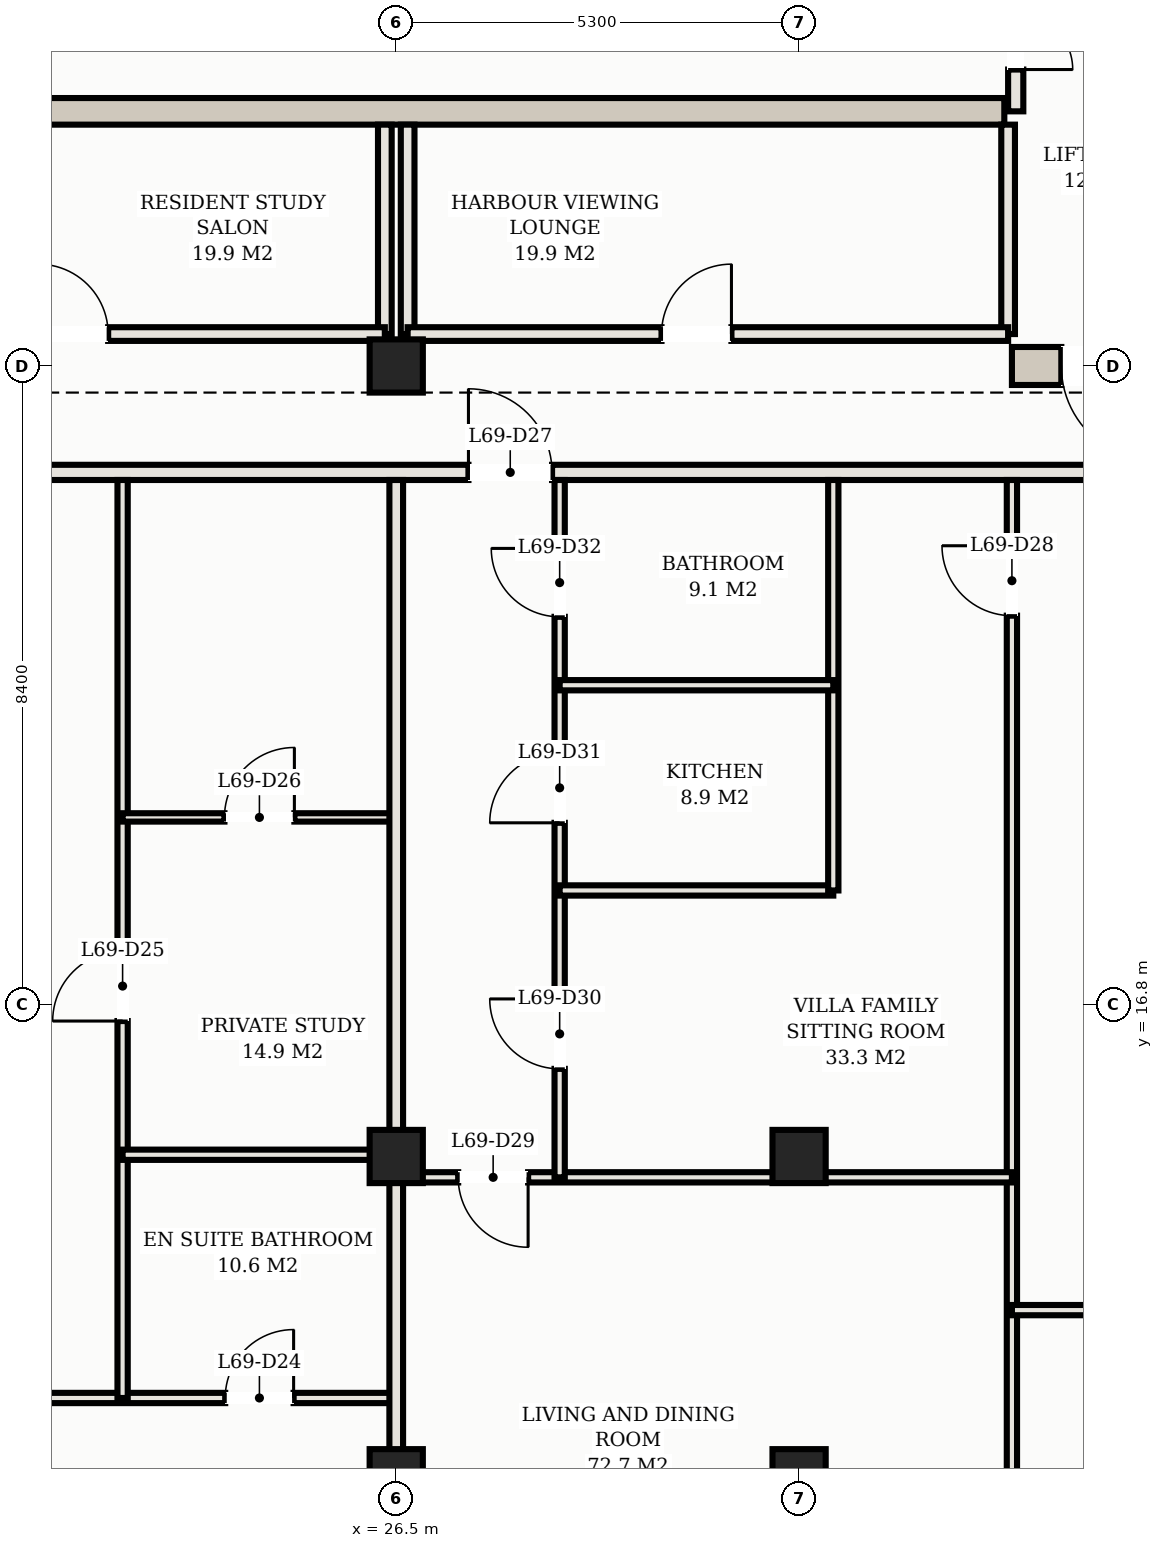
"""IFC4 building model, lengths in metres.
Left out: names, types, materials, properties, quantities, classifications, styles, units other than length and angle.
Written with IfcOpenShell. Run it as: python <this file> out.ifc"""

import sys

from ifc_helpers import new_model, si_unit, direction, frame, frame_2d, origin, origin_2d, place, context, subcontext, project, spatial, rectangle, hollow_rectangle, extrude, element, fill, save


model = new_model("IFC4")
c1 = context("Model", 3, precision=1e-05, world=origin(), true_north=direction((0.0, 1.0)))
c2 = subcontext(c1, "Body", "Model", "MODEL_VIEW")
j1 = project(units=[si_unit("LENGTHUNIT", "METRE"), si_unit("PLANEANGLEUNIT", "RADIAN")], contexts=[c1])
p1 = place(None, origin())
s1 = spatial("IfcSite", under=j1, at=p1, CompositionType="ELEMENT")
p2 = place(p1, origin())
s2 = spatial("IfcBuilding", under=s1, at=p2, CompositionType="ELEMENT")
p3 = place(p2, frame((0.0, 0.0, 249.5)))
s3 = spatial("IfcBuildingStorey", under=s2, at=p3, CompositionType="ELEMENT", Elevation=249.5)
p4 = place(p3, frame((34.6, 25.2, 0.0), z_axis=(0.0, 0.0, 1.0), x_axis=(1.0, 0.0, 0.0)))
e1 = element("IfcWall", 1, at=p4, inside=s3, PredefinedType="SHEAR", context=c2, shape_type="SweptSolid", body=[
    extrude(rectangle(XDim=8.05, YDim=0.5, at=frame_2d((4.025, 0.0))), origin(), (0.0, 0.0, 1.0), 3.11),
])
p5 = place(p4, frame((0.65, 0.0, 0.0)))
e2 = element("IfcOpeningElement", 2, at=p5, cuts=e1, PredefinedType="OPENING", context=c2, shape_type="SweptSolid", body=[
    extrude(rectangle(XDim=1.25, YDim=2.2, at=frame_2d((0.625, 1.1))), frame((0.0, 0.26, 0.0), z_axis=(0.0, -1.0, 0.0), x_axis=(1.0, 0.0, 0.0)), (0.0, 0.0, 1.0), 0.52),
])
p6 = place(p3, frame((18.5, 28.55, 0.0), z_axis=(0.0, 0.0, 1.0), x_axis=(1.0, 0.0, 0.0)))
e3 = element("IfcWall", 3, at=p6, inside=s3, PredefinedType="SHEAR", context=c2, shape_type="SweptSolid", body=[
    extrude(rectangle(XDim=16.0, YDim=0.35, at=frame_2d((8.0, 0.0))), origin(), (0.0, 0.0, 1.0), 3.11),
])
for number, where, z_axis, x_axis in (
    (4, (26.5, 25.2, 0.0), (0.0, 0.0, 1.0), (1.0, 0.0, 0.0)),
    (5, (26.5, 14.8, 0.0), (0.0, 0.0, 1.0), (1.0, 0.0, 0.0)),
    (6, (26.5, 10.6, 0.0), (0.0, 0.0, 1.0), (1.0, 0.0, 0.0)),
    (7, (31.8, 14.8, 0.0), (0.0, 0.0, 1.0), (1.0, 0.0, 0.0)),
    (8, (31.8, 10.6, 0.0), (0.0, 0.0, 1.0), (1.0, 0.0, 0.0)),
):
    element("IfcColumn", number, at=place(p3, frame(where, z_axis=z_axis, x_axis=x_axis)), inside=s3, PredefinedType="COLUMN", context=c2, shape_type="SweptSolid", body=[
        extrude(hollow_rectangle(XDim=0.7, YDim=0.7, WallThickness=0.025, at=origin_2d()), origin(), (0.0, 0.0, 1.0), 3.3),
    ])
p7 = place(p3, frame((34.65, 28.55, 0.0), z_axis=(0.0, 0.0, 1.0), x_axis=(0.0, 1.0, 0.0)))
e9 = element("IfcWall", 9, at=p7, inside=s3, PredefinedType="PARTITIONING", context=c2, shape_type="SweptSolid", body=[
    extrude(rectangle(XDim=2.6, YDim=0.2, at=frame_2d((1.3, 0.0))), origin(), (0.0, 0.0, 1.0), 2.45),
])
p8 = place(p7, frame((0.55, 0.0, 0.0)))
e10 = element("IfcOpeningElement", 10, at=p8, cuts=e9, PredefinedType="OPENING", context=c2, shape_type="SweptSolid", body=[
    extrude(rectangle(XDim=1.5, YDim=2.25, at=frame_2d((0.75, 1.125))), frame((0.0, 0.11, 0.0), z_axis=(0.0, -1.0, 0.0), x_axis=(1.0, 0.0, 0.0)), (0.0, 0.0, 1.0), 0.22),
])
p9 = place(p3, frame((26.35, 25.62, 0.0), z_axis=(0.0, 0.0, 1.0), x_axis=(0.0, 1.0, 0.0)))
e11 = element("IfcWall", 11, at=p9, inside=s3, PredefinedType="PARTITIONING", context=c2, shape_type="SweptSolid", body=[
    extrude(rectangle(XDim=2.755, YDim=0.18, at=frame_2d((1.377, 0.0))), origin(), (0.0, 0.0, 1.0), 2.45),
])
p10 = place(p3, frame((18.45, 25.62, 0.0), z_axis=(0.0, 0.0, 1.0), x_axis=(1.0, 0.0, 0.0)))
e12 = element("IfcWall", 12, at=p10, inside=s3, PredefinedType="PARTITIONING", context=c2, shape_type="SweptSolid", body=[
    extrude(rectangle(XDim=7.9, YDim=0.18, at=frame_2d((3.95, 0.0))), origin(), (0.0, 0.0, 1.0), 2.45),
])
p11 = place(p10, frame((3.34, 0.0, 0.0)))
e13 = element("IfcOpeningElement", 13, at=p11, cuts=e12, PredefinedType="OPENING", context=c2, shape_type="SweptSolid", body=[
    extrude(rectangle(XDim=0.92, YDim=2.15, at=frame_2d((0.46, 1.075))), frame((0.0, 0.1, 0.0), z_axis=(0.0, -1.0, 0.0), x_axis=(1.0, 0.0, 0.0)), (0.0, 0.0, 1.0), 0.2),
])
for number, where, z_axis, x_axis in (
    (14, (26.65, 25.62, 0.0), (0.0, 0.0, 1.0), (0.0, 1.0, 0.0)),
    (15, (34.55, 25.62, 0.0), (0.0, 0.0, 1.0), (0.0, 1.0, 0.0)),
):
    element("IfcWall", number, at=place(p3, frame(where, z_axis=z_axis, x_axis=x_axis)), inside=s3, PredefinedType="PARTITIONING", context=c2, shape_type="SweptSolid", body=[
        extrude(rectangle(XDim=2.755, YDim=0.18, at=frame_2d((1.377, 0.0))), origin(), (0.0, 0.0, 1.0), 2.45),
    ])
p12 = place(p3, frame((26.65, 25.62, 0.0), z_axis=(0.0, 0.0, 1.0), x_axis=(1.0, 0.0, 0.0)))
e16 = element("IfcWall", 16, at=p12, inside=s3, PredefinedType="PARTITIONING", context=c2, shape_type="SweptSolid", body=[
    extrude(rectangle(XDim=7.9, YDim=0.18, at=frame_2d((3.95, 0.0))), origin(), (0.0, 0.0, 1.0), 2.45),
])
p13 = place(p12, frame((3.34, 0.0, 0.0)))
e17 = element("IfcOpeningElement", 17, at=p13, cuts=e16, PredefinedType="OPENING", context=c2, shape_type="SweptSolid", body=[
    extrude(rectangle(XDim=0.92, YDim=2.15, at=frame_2d((0.46, 1.075))), frame((0.0, 0.1, 0.0), z_axis=(0.0, -1.0, 0.0), x_axis=(1.0, 0.0, 0.0)), (0.0, 0.0, 1.0), 0.2),
])
p14 = place(p3, frame((8.6, 23.8, 0.0), z_axis=(0.0, 0.0, 1.0), x_axis=(1.0, 0.0, 0.0)))
e18 = element("IfcWall", 18, at=p14, inside=s3, PredefinedType="PARTITIONING", context=c2, shape_type="SweptSolid", body=[
    extrude(rectangle(XDim=35.8, YDim=0.2, at=frame_2d((17.9, 0.0))), origin(), (0.0, 0.0, 1.0), 2.45),
])
p15 = place(p14, frame((2.75, 0.0, 0.0)))
e19 = element("IfcOpeningElement", 19, at=p15, cuts=e18, PredefinedType="OPENING", context=c2, shape_type="SweptSolid", body=[
    extrude(rectangle(XDim=1.1, YDim=2.25, at=frame_2d((0.55, 1.125))), frame((0.0, 0.11, 0.0), z_axis=(0.0, -1.0, 0.0), x_axis=(1.0, 0.0, 0.0)), (0.0, 0.0, 1.0), 0.22),
])
p16 = place(p14, frame((18.85, 0.0, 0.0)))
e20 = element("IfcOpeningElement", 20, at=p16, cuts=e18, PredefinedType="OPENING", context=c2, shape_type="SweptSolid", body=[
    extrude(rectangle(XDim=1.1, YDim=2.25, at=frame_2d((0.55, 1.125))), frame((0.0, 0.11, 0.0), z_axis=(0.0, -1.0, 0.0), x_axis=(1.0, 0.0, 0.0)), (0.0, 0.0, 1.0), 0.22),
])
p17 = place(p14, frame((0.505, 0.0, 0.0)))
e21 = element("IfcOpeningElement", 21, at=p17, cuts=e18, PredefinedType="OPENING", context=c2, shape_type="SweptSolid", body=[
    extrude(rectangle(XDim=0.9, YDim=2.15, at=frame_2d((0.45, 1.075))), frame((0.0, 0.11, 0.0), z_axis=(0.0, -1.0, 0.0), x_axis=(1.0, 0.0, 0.0)), (0.0, 0.0, 1.0), 0.22),
])
p18 = place(p14, frame((34.395, 0.0, 0.0)))
e22 = element("IfcOpeningElement", 22, at=p18, cuts=e18, PredefinedType="OPENING", context=c2, shape_type="SweptSolid", body=[
    extrude(rectangle(XDim=0.9, YDim=2.15, at=frame_2d((0.45, 1.075))), frame((0.0, 0.11, 0.0), z_axis=(0.0, -1.0, 0.0), x_axis=(1.0, 0.0, 0.0)), (0.0, 0.0, 1.0), 0.22),
])
p19 = place(p3, frame((17.8, 11.623, 0.0), z_axis=(0.0, 0.0, 1.0), x_axis=(1.0, 0.0, 0.0)))
e23 = element("IfcWall", 23, at=p19, inside=s3, PredefinedType="PARTITIONING", context=c2, shape_type="SweptSolid", body=[
    extrude(rectangle(XDim=8.7, YDim=0.135, at=frame_2d((4.35, 0.0))), origin(), (0.0, 0.0, 1.0), 2.45),
])
p20 = place(p19, frame((1.125, 0.0, 0.0)))
e24 = element("IfcOpeningElement", 24, at=p20, cuts=e23, PredefinedType="OPENING", context=c2, shape_type="SweptSolid", body=[
    extrude(rectangle(XDim=0.95, YDim=2.15, at=frame_2d((0.475, 1.075))), frame((0.0, 0.078, 0.0), z_axis=(0.0, -1.0, 0.0), x_axis=(1.0, 0.0, 0.0)), (0.0, 0.0, 1.0), 0.155),
])
p21 = place(p19, frame((6.45, 0.0, 0.0)))
e25 = element("IfcOpeningElement", 25, at=p21, cuts=e23, PredefinedType="OPENING", context=c2, shape_type="SweptSolid", body=[
    extrude(rectangle(XDim=0.9, YDim=2.15, at=frame_2d((0.45, 1.075))), frame((0.0, 0.078, 0.0), z_axis=(0.0, -1.0, 0.0), x_axis=(1.0, 0.0, 0.0)), (0.0, 0.0, 1.0), 0.155),
])
p22 = place(p3, frame((22.9, 11.623, 0.0), z_axis=(0.0, 0.0, 1.0), x_axis=(0.0, 1.0, 0.0)))
e26 = element("IfcWall", 26, at=p22, inside=s3, PredefinedType="PARTITIONING", context=c2, shape_type="SweptSolid", body=[
    extrude(rectangle(XDim=12.077, YDim=0.135, at=frame_2d((6.039, 0.0))), origin(), (0.0, 0.0, 1.0), 2.45),
])
p23 = place(p22, frame((4.959, 0.0, 0.0)))
e27 = element("IfcOpeningElement", 27, at=p23, cuts=e26, PredefinedType="OPENING", context=c2, shape_type="SweptSolid", body=[
    extrude(rectangle(XDim=0.92, YDim=2.15, at=frame_2d((0.46, 1.075))), frame((0.0, 0.078, 0.0), z_axis=(0.0, -1.0, 0.0), x_axis=(1.0, 0.0, 0.0)), (0.0, 0.0, 1.0), 0.155),
])
p24 = place(p3, frame((22.9, 14.823, 0.0), z_axis=(0.0, 0.0, 1.0), x_axis=(1.0, 0.0, 0.0)))
e28 = element("IfcWall", 28, at=p24, inside=s3, PredefinedType="PARTITIONING", context=c2, shape_type="SweptSolid", body=[
    extrude(rectangle(XDim=3.6, YDim=0.135, at=frame_2d((1.8, 0.0))), origin(), (0.0, 0.0, 1.0), 2.45),
])
p25 = place(p3, frame((22.9, 19.261, 0.0), z_axis=(0.0, 0.0, 1.0), x_axis=(1.0, 0.0, 0.0)))
e29 = element("IfcWall", 29, at=p25, inside=s3, PredefinedType="MOVABLE", context=c2, shape_type="SweptSolid", body=[
    extrude(rectangle(XDim=3.6, YDim=0.11, at=frame_2d((1.8, 0.0))), origin(), (0.0, 0.0, 1.0), 2.45),
])
p26 = place(p25, frame((1.34, 0.0, 0.0)))
e30 = element("IfcOpeningElement", 30, at=p26, cuts=e29, PredefinedType="OPENING", context=c2, shape_type="SweptSolid", body=[
    extrude(rectangle(XDim=0.92, YDim=2.15, at=frame_2d((0.46, 1.075))), frame((0.0, 0.065, 0.0), z_axis=(0.0, -1.0, 0.0), x_axis=(1.0, 0.0, 0.0)), (0.0, 0.0, 1.0), 0.13),
])
p27 = place(p3, frame((26.5, 6.92, 0.0), z_axis=(0.0, 0.0, 1.0), x_axis=(0.0, 1.0, 0.0)))
e31 = element("IfcWall", 31, at=p27, inside=s3, PredefinedType="PARTITIONING", context=c2, shape_type="SweptSolid", body=[
    extrude(rectangle(XDim=16.78, YDim=0.18, at=frame_2d((8.39, 0.0))), origin(), (0.0, 0.0, 1.0), 2.45),
])
p28 = place(p3, frame((34.6, 8.42, 0.0), z_axis=(0.0, 0.0, 1.0), x_axis=(0.0, 1.0, 0.0)))
e32 = element("IfcWall", 32, at=p28, inside=s3, PredefinedType="PARTITIONING", context=c2, shape_type="SweptSolid", body=[
    extrude(rectangle(XDim=15.28, YDim=0.135, at=frame_2d((7.64, 0.0))), origin(), (0.0, 0.0, 1.0), 2.45),
])
p29 = place(p28, frame((13.495, 0.0, 0.0)))
e33 = element("IfcOpeningElement", 33, at=p29, cuts=e32, PredefinedType="OPENING", context=c2, shape_type="SweptSolid", body=[
    extrude(rectangle(XDim=0.92, YDim=2.15, at=frame_2d((0.46, 1.075))), frame((0.0, 0.078, 0.0), z_axis=(0.0, -1.0, 0.0), x_axis=(1.0, 0.0, 0.0)), (0.0, 0.0, 1.0), 0.155),
])
p30 = place(p3, frame((26.5, 14.526, 0.0), z_axis=(0.0, 0.0, 1.0), x_axis=(1.0, 0.0, 0.0)))
e34 = element("IfcWall", 34, at=p30, inside=s3, PredefinedType="PARTITIONING", context=c2, shape_type="SweptSolid", body=[
    extrude(rectangle(XDim=8.1, YDim=0.135, at=frame_2d((4.05, 0.0))), origin(), (0.0, 0.0, 1.0), 2.45),
])
p31 = place(p30, frame((0.815, 0.0, 0.0)))
e35 = element("IfcOpeningElement", 35, at=p31, cuts=e34, PredefinedType="OPENING", context=c2, shape_type="SweptSolid", body=[
    extrude(rectangle(XDim=0.92, YDim=2.15, at=frame_2d((0.46, 1.075))), frame((0.0, 0.078, 0.0), z_axis=(0.0, -1.0, 0.0), x_axis=(1.0, 0.0, 0.0)), (0.0, 0.0, 1.0), 0.155),
])
p32 = place(p3, frame((28.65, 14.526, 0.0), z_axis=(0.0, 0.0, 1.0), x_axis=(0.0, 1.0, 0.0)))
e36 = element("IfcWall", 36, at=p32, inside=s3, PredefinedType="PARTITIONING", context=c2, shape_type="SweptSolid", body=[
    extrude(rectangle(XDim=9.174, YDim=0.135, at=frame_2d((4.587, 0.0))), origin(), (0.0, 0.0, 1.0), 2.45),
])
p33 = place(p32, frame((1.427, 0.0, 0.0)))
e37 = element("IfcOpeningElement", 37, at=p33, cuts=e36, PredefinedType="OPENING", context=c2, shape_type="SweptSolid", body=[
    extrude(rectangle(XDim=0.92, YDim=2.15, at=frame_2d((0.46, 1.075))), frame((0.0, 0.078, 0.0), z_axis=(0.0, -1.0, 0.0), x_axis=(1.0, 0.0, 0.0)), (0.0, 0.0, 1.0), 0.155),
])
p34 = place(p32, frame((4.664, 0.0, 0.0)))
e38 = element("IfcOpeningElement", 38, at=p34, cuts=e36, PredefinedType="OPENING", context=c2, shape_type="SweptSolid", body=[
    extrude(rectangle(XDim=0.92, YDim=2.15, at=frame_2d((0.46, 1.075))), frame((0.0, 0.078, 0.0), z_axis=(0.0, -1.0, 0.0), x_axis=(1.0, 0.0, 0.0)), (0.0, 0.0, 1.0), 0.155),
])
p35 = place(p32, frame((7.374, 0.0, 0.0)))
e39 = element("IfcOpeningElement", 39, at=p35, cuts=e36, PredefinedType="OPENING", context=c2, shape_type="SweptSolid", body=[
    extrude(rectangle(XDim=0.9, YDim=2.15, at=frame_2d((0.45, 1.075))), frame((0.0, 0.078, 0.0), z_axis=(0.0, -1.0, 0.0), x_axis=(1.0, 0.0, 0.0)), (0.0, 0.0, 1.0), 0.155),
])
p36 = place(p3, frame((28.65, 18.3, 0.0), z_axis=(0.0, 0.0, 1.0), x_axis=(1.0, 0.0, 0.0)))
e40 = element("IfcWall", 40, at=p36, inside=s3, PredefinedType="PARTITIONING", context=c2, shape_type="SweptSolid", body=[
    extrude(rectangle(XDim=3.6, YDim=0.135, at=frame_2d((1.8, 0.0))), origin(), (0.0, 0.0, 1.0), 2.45),
])
p37 = place(p3, frame((32.25, 18.3, 0.0), z_axis=(0.0, 0.0, 1.0), x_axis=(0.0, 1.0, 0.0)))
e41 = element("IfcWall", 41, at=p37, inside=s3, PredefinedType="PARTITIONING", context=c2, shape_type="SweptSolid", body=[
    extrude(rectangle(XDim=5.4, YDim=0.135, at=frame_2d((2.7, 0.0))), origin(), (0.0, 0.0, 1.0), 2.45),
])
p38 = place(p3, frame((28.65, 21.0, 0.0), z_axis=(0.0, 0.0, 1.0), x_axis=(1.0, 0.0, 0.0)))
e42 = element("IfcWall", 42, at=p38, inside=s3, PredefinedType="PARTITIONING", context=c2, shape_type="SweptSolid", body=[
    extrude(rectangle(XDim=3.6, YDim=0.135, at=frame_2d((1.8, 0.0))), origin(), (0.0, 0.0, 1.0), 2.45),
])
p39 = place(p3, frame((34.6, 12.779, 0.0), z_axis=(0.0, 0.0, 1.0), x_axis=(1.0, 0.0, 0.0)))
e43 = element("IfcWall", 43, at=p39, inside=s3, PredefinedType="PARTITIONING", context=c2, shape_type="SweptSolid", body=[
    extrude(rectangle(XDim=7.8, YDim=0.135, at=frame_2d((3.9, 0.0))), origin(), (0.0, 0.0, 1.0), 2.45),
])
p40 = place(p39, frame((1.625, 0.0, 0.0)))
e44 = element("IfcOpeningElement", 44, at=p40, cuts=e43, PredefinedType="OPENING", context=c2, shape_type="SweptSolid", body=[
    extrude(rectangle(XDim=0.95, YDim=2.15, at=frame_2d((0.475, 1.075))), frame((0.0, 0.078, 0.0), z_axis=(0.0, -1.0, 0.0), x_axis=(1.0, 0.0, 0.0)), (0.0, 0.0, 1.0), 0.155),
])
p41 = place(p39, frame((5.55, 0.0, 0.0)))
e45 = element("IfcOpeningElement", 45, at=p41, cuts=e43, PredefinedType="OPENING", context=c2, shape_type="SweptSolid", body=[
    extrude(rectangle(XDim=0.9, YDim=2.15, at=frame_2d((0.45, 1.075))), frame((0.0, 0.078, 0.0), z_axis=(0.0, -1.0, 0.0), x_axis=(1.0, 0.0, 0.0)), (0.0, 0.0, 1.0), 0.155),
])
p42 = place(p5, frame((1.25, 0.0, 0.0), z_axis=(0.0, 0.0, 1.0), x_axis=(-1.0, 0.0, 0.0)))
e46 = element("IfcDoor", 46, at=p42, inside=s3, OperationType="SINGLE_SWING_LEFT", PredefinedType="DOOR", context=c2, shape_type="SweptSolid", body=[
    extrude(rectangle(XDim=1.25, YDim=2.2, at=frame_2d((0.625, 1.1))), frame((0.0, 0.025, 0.0), z_axis=(0.0, -1.0, 0.0), x_axis=(1.0, 0.0, 0.0)), (0.0, 0.0, 1.0), 0.05),
])
fill(e2, e46)
p43 = place(p8, frame((1.5, 0.0, 0.0), z_axis=(0.0, 0.0, 1.0), x_axis=(-1.0, 0.0, 0.0)))
e47 = element("IfcDoor", 47, at=p43, inside=s3, OperationType="DOUBLE_DOOR_SINGLE_SWING", PredefinedType="DOOR", context=c2, shape_type="SweptSolid", body=[
    extrude(rectangle(XDim=1.5, YDim=2.25, at=frame_2d((0.75, 1.125))), frame((0.0, 0.025, 0.0), z_axis=(0.0, -1.0, 0.0), x_axis=(1.0, 0.0, 0.0)), (0.0, 0.0, 1.0), 0.05),
])
fill(e10, e47)
p44 = place(p11, origin())
e48 = element("IfcDoor", 48, at=p44, inside=s3, OperationType="SINGLE_SWING_LEFT", PredefinedType="DOOR", context=c2, shape_type="SweptSolid", body=[
    extrude(rectangle(XDim=0.92, YDim=2.15, at=frame_2d((0.46, 1.075))), frame((0.0, 0.025, 0.0), z_axis=(0.0, -1.0, 0.0), x_axis=(1.0, 0.0, 0.0)), (0.0, 0.0, 1.0), 0.05),
])
fill(e13, e48)
p45 = place(p13, origin())
e49 = element("IfcDoor", 49, at=p45, inside=s3, OperationType="SINGLE_SWING_RIGHT", PredefinedType="DOOR", context=c2, shape_type="SweptSolid", body=[
    extrude(rectangle(XDim=0.92, YDim=2.15, at=frame_2d((0.46, 1.075))), frame((0.0, 0.025, 0.0), z_axis=(0.0, -1.0, 0.0), x_axis=(1.0, 0.0, 0.0)), (0.0, 0.0, 1.0), 0.05),
])
fill(e17, e49)
p46 = place(p21, origin())
e50 = element("IfcDoor", 50, at=p46, inside=s3, OperationType="SINGLE_SWING_RIGHT", PredefinedType="DOOR", context=c2, shape_type="SweptSolid", body=[
    extrude(rectangle(XDim=0.9, YDim=2.15, at=frame_2d((0.45, 1.075))), frame((0.0, 0.025, 0.0), z_axis=(0.0, -1.0, 0.0), x_axis=(1.0, 0.0, 0.0)), (0.0, 0.0, 1.0), 0.05),
])
fill(e25, e50)
p47 = place(p23, origin())
e51 = element("IfcDoor", 51, at=p47, inside=s3, OperationType="SINGLE_SWING_LEFT", PredefinedType="DOOR", context=c2, shape_type="SweptSolid", body=[
    extrude(rectangle(XDim=0.92, YDim=2.15, at=frame_2d((0.46, 1.075))), frame((0.0, 0.025, 0.0), z_axis=(0.0, -1.0, 0.0), x_axis=(1.0, 0.0, 0.0)), (0.0, 0.0, 1.0), 0.05),
])
fill(e27, e51)
p48 = place(p26, origin())
e52 = element("IfcDoor", 52, at=p48, inside=s3, OperationType="SINGLE_SWING_RIGHT", PredefinedType="DOOR", context=c2, shape_type="SweptSolid", body=[
    extrude(rectangle(XDim=0.92, YDim=2.15, at=frame_2d((0.46, 1.075))), frame((0.0, 0.025, 0.0), z_axis=(0.0, -1.0, 0.0), x_axis=(1.0, 0.0, 0.0)), (0.0, 0.0, 1.0), 0.05),
])
fill(e30, e52)
p49 = place(p16, origin())
e53 = element("IfcDoor", 53, at=p49, inside=s3, OperationType="SINGLE_SWING_LEFT", PredefinedType="DOOR", context=c2, shape_type="SweptSolid", body=[
    extrude(rectangle(XDim=1.1, YDim=2.25, at=frame_2d((0.55, 1.125))), frame((0.0, 0.025, 0.0), z_axis=(0.0, -1.0, 0.0), x_axis=(1.0, 0.0, 0.0)), (0.0, 0.0, 1.0), 0.05),
])
fill(e20, e53)
p50 = place(p29, origin())
e54 = element("IfcDoor", 54, at=p50, inside=s3, OperationType="SINGLE_SWING_RIGHT", PredefinedType="DOOR", context=c2, shape_type="SweptSolid", body=[
    extrude(rectangle(XDim=0.92, YDim=2.15, at=frame_2d((0.46, 1.075))), frame((0.0, 0.025, 0.0), z_axis=(0.0, -1.0, 0.0), x_axis=(1.0, 0.0, 0.0)), (0.0, 0.0, 1.0), 0.05),
])
fill(e33, e54)
p51 = place(p31, frame((0.92, 0.0, 0.0), z_axis=(0.0, 0.0, 1.0), x_axis=(-1.0, 0.0, 0.0)))
e55 = element("IfcDoor", 55, at=p51, inside=s3, OperationType="SINGLE_SWING_LEFT", PredefinedType="DOOR", context=c2, shape_type="SweptSolid", body=[
    extrude(rectangle(XDim=0.92, YDim=2.15, at=frame_2d((0.46, 1.075))), frame((0.0, 0.025, 0.0), z_axis=(0.0, -1.0, 0.0), x_axis=(1.0, 0.0, 0.0)), (0.0, 0.0, 1.0), 0.05),
])
fill(e35, e55)
p52 = place(p33, origin())
e56 = element("IfcDoor", 56, at=p52, inside=s3, OperationType="SINGLE_SWING_RIGHT", PredefinedType="DOOR", context=c2, shape_type="SweptSolid", body=[
    extrude(rectangle(XDim=0.92, YDim=2.15, at=frame_2d((0.46, 1.075))), frame((0.0, 0.025, 0.0), z_axis=(0.0, -1.0, 0.0), x_axis=(1.0, 0.0, 0.0)), (0.0, 0.0, 1.0), 0.05),
])
fill(e37, e56)
p53 = place(p34, origin())
e57 = element("IfcDoor", 57, at=p53, inside=s3, OperationType="SINGLE_SWING_LEFT", PredefinedType="DOOR", context=c2, shape_type="SweptSolid", body=[
    extrude(rectangle(XDim=0.92, YDim=2.15, at=frame_2d((0.46, 1.075))), frame((0.0, 0.025, 0.0), z_axis=(0.0, -1.0, 0.0), x_axis=(1.0, 0.0, 0.0)), (0.0, 0.0, 1.0), 0.05),
])
fill(e38, e57)
p54 = place(p35, origin())
e58 = element("IfcDoor", 58, at=p54, inside=s3, OperationType="SINGLE_SWING_RIGHT", PredefinedType="DOOR", context=c2, shape_type="SweptSolid", body=[
    extrude(rectangle(XDim=0.9, YDim=2.15, at=frame_2d((0.45, 1.075))), frame((0.0, 0.025, 0.0), z_axis=(0.0, -1.0, 0.0), x_axis=(1.0, 0.0, 0.0)), (0.0, 0.0, 1.0), 0.05),
])
fill(e39, e58)
save(model, sys.argv[1])
